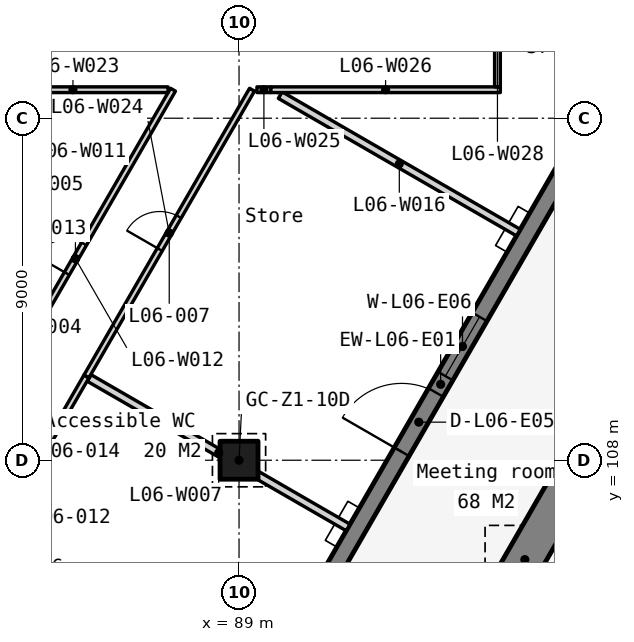
"""IFC4 building model, lengths in metres.
Left out: names, types, materials, properties, quantities, classifications, styles, units other than length and angle.
Written with IfcOpenShell. Run it as: python <this file> out.ifc"""

import sys

from ifc_helpers import new_model, si_unit, direction, frame, frame_2d, origin, origin_2d, place, context, subcontext, project, spatial, polyline, rectangle, outline, extrude, element, fill, save


model = new_model("IFC4")
c1 = context("Model", 3, precision=1e-05, world=origin(), true_north=direction((0.0, 1.0)))
c2 = subcontext(c1, "Body", "Model", "MODEL_VIEW")
j1 = project(units=[si_unit("LENGTHUNIT", "METRE"), si_unit("PLANEANGLEUNIT", "RADIAN")], contexts=[c1])
p1 = place(None, origin())
s1 = spatial("IfcSite", under=j1, at=p1, CompositionType="ELEMENT")
p2 = place(p1, origin())
s2 = spatial("IfcBuilding", under=s1, at=p2, CompositionType="ELEMENT")
p3 = place(p2, frame((0.0, 0.0, 35.0)))
s3 = spatial("IfcBuildingStorey", under=s2, at=p3, CompositionType="ELEMENT", Elevation=35.0)
p4 = place(p3, frame((89.0, 108.0, 0.0), z_axis=(0.0, 0.0, 1.0), x_axis=(1.0, 0.0, 0.0)))
e1 = element("IfcColumn", 1, at=p4, inside=s3, PredefinedType="COLUMN", context=c2, shape_type="SweptSolid", body=[
    extrude(rectangle(XDim=1.0, YDim=1.0, at=origin_2d()), origin(), (0.0, 0.0, 1.0), 3.5),
])
p5 = place(p3, frame((83.105, 90.599, -0.2), z_axis=(0.0, 0.0, 1.0), x_axis=(0.499999201451, 0.866025864826, 0.0)))
e2 = element("IfcWall", 2, at=p5, inside=s3, PredefinedType="SOLIDWALL", context=c2, shape_type="SweptSolid", body=[
    extrude(outline(polyline([(44.8, 0.0), (44.8, 3.55), (0.0, 3.55), (0.0, 0.0), (44.8, 0.0)])), frame((0.0, 0.225, 0.0), z_axis=(0.0, -1.0, 0.0), x_axis=(1.0, 0.0, 0.0)), (0.0, 0.0, 1.0), 0.45),
])
p6 = place(p5, frame((2.43, 0.0, 1.1)))
e3 = element("IfcOpeningElement", 3, at=p6, cuts=e2, PredefinedType="OPENING", context=c2, shape_type="SweptSolid", body=[
    extrude(rectangle(XDim=1.8, YDim=1.5, at=frame_2d((0.9, 0.75))), frame((0.0, 0.235, 0.0), z_axis=(0.0, -1.0, 0.0), x_axis=(1.0, 0.0, 0.0)), (0.0, 0.0, 1.0), 0.47),
])
p7 = place(p5, frame((4.73, 0.0, 0.2)))
e4 = element("IfcOpeningElement", 4, at=p7, cuts=e2, PredefinedType="OPENING", context=c2, shape_type="SweptSolid", body=[
    extrude(rectangle(XDim=1.8, YDim=2.4, at=frame_2d((0.9, 1.2))), frame((0.0, 0.235, 0.0), z_axis=(0.0, -1.0, 0.0), x_axis=(1.0, 0.0, 0.0)), (0.0, 0.0, 1.0), 0.47),
])
p8 = place(p5, frame((11.39, 0.0, 1.1)))
e5 = element("IfcOpeningElement", 5, at=p8, cuts=e2, PredefinedType="OPENING", context=c2, shape_type="SweptSolid", body=[
    extrude(rectangle(XDim=1.8, YDim=1.5, at=frame_2d((0.9, 0.75))), frame((0.0, 0.235, 0.0), z_axis=(0.0, -1.0, 0.0), x_axis=(1.0, 0.0, 0.0)), (0.0, 0.0, 1.0), 0.47),
])
p9 = place(p5, frame((13.69, 0.0, 1.1)))
e6 = element("IfcOpeningElement", 6, at=p9, cuts=e2, PredefinedType="OPENING", context=c2, shape_type="SweptSolid", body=[
    extrude(rectangle(XDim=1.8, YDim=1.5, at=frame_2d((0.9, 0.75))), frame((0.0, 0.235, 0.0), z_axis=(0.0, -1.0, 0.0), x_axis=(1.0, 0.0, 0.0)), (0.0, 0.0, 1.0), 0.47),
])
p10 = place(p5, frame((20.35, 0.0, 0.2)))
e7 = element("IfcOpeningElement", 7, at=p10, cuts=e2, PredefinedType="OPENING", context=c2, shape_type="SweptSolid", body=[
    extrude(rectangle(XDim=1.8, YDim=2.4, at=frame_2d((0.9, 1.2))), frame((0.0, 0.235, 0.0), z_axis=(0.0, -1.0, 0.0), x_axis=(1.0, 0.0, 0.0)), (0.0, 0.0, 1.0), 0.47),
])
p11 = place(p5, frame((22.65, 0.0, 1.1)))
e8 = element("IfcOpeningElement", 8, at=p11, cuts=e2, PredefinedType="OPENING", context=c2, shape_type="SweptSolid", body=[
    extrude(rectangle(XDim=1.8, YDim=1.5, at=frame_2d((0.9, 0.75))), frame((0.0, 0.235, 0.0), z_axis=(0.0, -1.0, 0.0), x_axis=(1.0, 0.0, 0.0)), (0.0, 0.0, 1.0), 0.47),
])
p12 = place(p5, frame((29.31, 0.0, 1.1)))
e9 = element("IfcOpeningElement", 9, at=p12, cuts=e2, PredefinedType="OPENING", context=c2, shape_type="SweptSolid", body=[
    extrude(rectangle(XDim=1.8, YDim=1.5, at=frame_2d((0.9, 0.75))), frame((0.0, 0.235, 0.0), z_axis=(0.0, -1.0, 0.0), x_axis=(1.0, 0.0, 0.0)), (0.0, 0.0, 1.0), 0.47),
])
p13 = place(p5, frame((31.61, 0.0, 0.2)))
e10 = element("IfcOpeningElement", 10, at=p13, cuts=e2, PredefinedType="OPENING", context=c2, shape_type="SweptSolid", body=[
    extrude(rectangle(XDim=1.8, YDim=2.4, at=frame_2d((0.9, 1.2))), frame((0.0, 0.235, 0.0), z_axis=(0.0, -1.0, 0.0), x_axis=(1.0, 0.0, 0.0)), (0.0, 0.0, 1.0), 0.47),
])
p14 = place(p5, frame((38.27, 0.0, 1.1)))
e11 = element("IfcOpeningElement", 11, at=p14, cuts=e2, PredefinedType="OPENING", context=c2, shape_type="SweptSolid", body=[
    extrude(rectangle(XDim=1.8, YDim=1.5, at=frame_2d((0.9, 0.75))), frame((0.0, 0.235, 0.0), z_axis=(0.0, -1.0, 0.0), x_axis=(1.0, 0.0, 0.0)), (0.0, 0.0, 1.0), 0.47),
])
p15 = place(p5, frame((40.57, 0.0, 1.1)))
e12 = element("IfcOpeningElement", 12, at=p15, cuts=e2, PredefinedType="OPENING", context=c2, shape_type="SweptSolid", body=[
    extrude(rectangle(XDim=1.8, YDim=1.5, at=frame_2d((0.9, 0.75))), frame((0.0, 0.235, 0.0), z_axis=(0.0, -1.0, 0.0), x_axis=(1.0, 0.0, 0.0)), (0.0, 0.0, 1.0), 0.47),
])
p16 = place(p3, frame((110.208, 129.091, 0.0), z_axis=(0.0, 0.0, 1.0), x_axis=(-0.500001932243, -0.8660242882, 0.0)))
e13 = element("IfcWall", 13, at=p16, inside=s3, PredefinedType="STANDARD", context=c2, shape_type="SweptSolid", body=[
    extrude(rectangle(XDim=54.747, YDim=1.0, at=frame_2d((27.374, 0.0))), origin(), (0.0, 0.0, 1.0), 0.6),
])
p17 = place(p3, frame((85.059, 110.163, 0.0), z_axis=(0.0, 0.0, 1.0), x_axis=(0.866018618032, -0.500011753083, 0.0)))
e14 = element("IfcWall", 14, at=p17, inside=s3, PredefinedType="PARTITIONING", context=c2, shape_type="SweptSolid", body=[
    extrude(rectangle(XDim=7.865, YDim=0.2, at=frame_2d((3.933, 0.0))), origin(), (0.0, 0.0, 1.0), 3.35),
])
p18 = place(p3, frame((82.127, 108.854, 0.0), z_axis=(0.0, 0.0, 1.0), x_axis=(0.499994038704, 0.866028845513, 0.0)))
e15 = element("IfcWall", 15, at=p18, inside=s3, PredefinedType="PARTITIONING", context=c2, shape_type="SweptSolid", body=[
    extrude(rectangle(XDim=10.272, YDim=0.15, at=frame_2d((5.136, 0.0))), origin(), (0.0, 0.0, 1.0), 3.35),
])
p19 = place(p18, frame((4.686, 0.0, 0.0)))
e16 = element("IfcOpeningElement", 16, at=p19, cuts=e15, PredefinedType="OPENING", context=c2, shape_type="SweptSolid", body=[
    extrude(rectangle(XDim=0.9, YDim=2.1, at=frame_2d((0.45, 1.05))), frame((0.0, 0.085, 0.0), z_axis=(0.0, -1.0, 0.0), x_axis=(1.0, 0.0, 0.0)), (0.0, 0.0, 1.0), 0.17),
])
p20 = place(p3, frame((80.06, 101.675, 0.0), z_axis=(0.0, 0.0, 1.0), x_axis=(0.49999348569, 0.86602916479, 0.0)))
e17 = element("IfcWall", 17, at=p20, inside=s3, PredefinedType="PARTITIONING", context=c2, shape_type="SweptSolid", body=[
    extrude(rectangle(XDim=9.851, YDim=0.15, at=frame_2d((4.925, 0.0))), origin(), (0.0, 0.0, 1.0), 3.35),
])
p21 = place(p20, frame((4.425, 0.0, 0.0)))
e18 = element("IfcOpeningElement", 18, at=p21, cuts=e17, PredefinedType="OPENING", context=c2, shape_type="SweptSolid", body=[
    extrude(rectangle(XDim=1.0, YDim=2.1, at=frame_2d((0.5, 1.05))), frame((0.0, 0.085, 0.0), z_axis=(0.0, -1.0, 0.0), x_axis=(1.0, 0.0, 0.0)), (0.0, 0.0, 1.0), 0.17),
])
p22 = place(p3, frame((90.085, 117.607, 0.0), z_axis=(0.0, 0.0, 1.0), x_axis=(0.866027117883, -0.499997031082, 0.0)))
e19 = element("IfcWall", 19, at=p22, inside=s3, PredefinedType="PARTITIONING", context=c2, shape_type="SweptSolid", body=[
    extrude(rectangle(XDim=7.235, YDim=0.2, at=frame_2d((3.617, 0.0))), origin(), (0.0, 0.0, 1.0), 3.35),
])
p23 = place(p3, frame((82.127, 117.75, 0.0), z_axis=(0.0, 0.0, 1.0), x_axis=(1.0, 0.0, 0.0)))
e20 = element("IfcWall", 20, at=p23, inside=s3, PredefinedType="PARTITIONING", context=c2, shape_type="SweptSolid", body=[
    extrude(rectangle(XDim=5.006, YDim=0.15, at=frame_2d((2.503, 0.0))), origin(), (0.0, 0.0, 1.0), 3.35),
])
p24 = place(p3, frame((84.985, 110.206, 0.0), z_axis=(0.0, 0.0, 1.0), x_axis=(0.500015174863, 0.866016642396, 0.0)))
e21 = element("IfcWall", 21, at=p24, inside=s3, PredefinedType="PARTITIONING", context=c2, shape_type="SweptSolid", body=[
    extrude(rectangle(XDim=8.712, YDim=0.15, at=frame_2d((4.356, 0.0))), origin(), (0.0, 0.0, 1.0), 3.35),
])
p25 = place(p24, frame((3.856, 0.0, 0.0)))
e22 = element("IfcOpeningElement", 22, at=p25, cuts=e21, PredefinedType="OPENING", context=c2, shape_type="SweptSolid", body=[
    extrude(rectangle(XDim=1.0, YDim=2.1, at=frame_2d((0.5, 1.05))), frame((0.0, 0.085, 0.0), z_axis=(0.0, -1.0, 0.0), x_axis=(1.0, 0.0, 0.0)), (0.0, 0.0, 1.0), 0.17),
])
p26 = place(p3, frame((89.471, 117.75, 0.0), z_axis=(0.0, 0.0, 1.0), x_axis=(1.0, 0.0, 0.0)))
e23 = element("IfcWall", 23, at=p26, inside=s3, PredefinedType="PARTITIONING", context=c2, shape_type="SweptSolid", body=[
    extrude(rectangle(XDim=0.367, YDim=0.15, at=frame_2d((0.183, 0.0))), origin(), (0.0, 0.0, 1.0), 3.35),
])
p27 = place(p3, frame((89.838, 117.75, 0.0), z_axis=(0.0, 0.0, 1.0), x_axis=(1.0, 0.0, 0.0)))
e24 = element("IfcWall", 24, at=p27, inside=s3, PredefinedType="PARTITIONING", context=c2, shape_type="SweptSolid", body=[
    extrude(rectangle(XDim=6.037, YDim=0.15, at=frame_2d((3.019, 0.0))), origin(), (0.0, 0.0, 1.0), 3.35),
])
p28 = place(p3, frame((95.8, 117.825, 0.0), z_axis=(0.0, 0.0, 1.0), x_axis=(0.0, 1.0, 0.0)))
e25 = element("IfcWall", 25, at=p28, inside=s3, PredefinedType="PARTITIONING", context=c2, shape_type="SweptSolid", body=[
    extrude(rectangle(XDim=6.829, YDim=0.15, at=frame_2d((3.415, 0.0))), origin(), (0.0, 0.0, 1.0), 3.35),
])
p29 = place(p28, frame((2.915, 0.0, 0.0)))
e26 = element("IfcOpeningElement", 26, at=p29, cuts=e25, PredefinedType="OPENING", context=c2, shape_type="SweptSolid", body=[
    extrude(rectangle(XDim=1.0, YDim=2.1, at=frame_2d((0.5, 1.05))), frame((0.0, 0.085, 0.0), z_axis=(0.0, -1.0, 0.0), x_axis=(1.0, 0.0, 0.0)), (0.0, 0.0, 1.0), 0.17),
])
p30 = place(p10, origin())
e27 = element("IfcDoor", 27, at=p30, inside=s3, OperationType="SINGLE_SWING_LEFT", PredefinedType="DOOR", context=c2, shape_type="SweptSolid", body=[
    extrude(rectangle(XDim=1.8, YDim=2.4, at=frame_2d((0.9, 1.2))), frame((0.0, 0.025, 0.0), z_axis=(0.0, -1.0, 0.0), x_axis=(1.0, 0.0, 0.0)), (0.0, 0.0, 1.0), 0.05),
])
fill(e7, e27)
p31 = place(p11, origin())
e28 = element("IfcWindow", 28, at=p31, inside=s3, PartitioningType="SINGLE_PANEL", PredefinedType="WINDOW", context=c2, shape_type="SweptSolid", body=[
    extrude(rectangle(XDim=1.8, YDim=1.5, at=frame_2d((0.9, 0.75))), frame((0.0, 0.03, 0.0), z_axis=(0.0, -1.0, 0.0), x_axis=(1.0, 0.0, 0.0)), (0.0, 0.0, 1.0), 0.06),
])
fill(e8, e28)
p32 = place(p25, origin())
e29 = element("IfcDoor", 29, at=p32, inside=s3, OperationType="SINGLE_SWING_LEFT", PredefinedType="DOOR", context=c2, shape_type="SweptSolid", body=[
    extrude(rectangle(XDim=1.0, YDim=2.1, at=frame_2d((0.5, 1.05))), frame((0.0, 0.025, 0.0), z_axis=(0.0, -1.0, 0.0), x_axis=(1.0, 0.0, 0.0)), (0.0, 0.0, 1.0), 0.05),
])
fill(e22, e29)
p33 = place(p19, origin())
e30 = element("IfcDoor", 30, at=p33, inside=s3, OperationType="SINGLE_SWING_LEFT", PredefinedType="DOOR", context=c2, shape_type="SweptSolid", body=[
    extrude(rectangle(XDim=0.9, YDim=2.1, at=frame_2d((0.45, 1.05))), frame((0.0, 0.025, 0.0), z_axis=(0.0, -1.0, 0.0), x_axis=(1.0, 0.0, 0.0)), (0.0, 0.0, 1.0), 0.05),
])
fill(e16, e30)
save(model, sys.argv[1])
